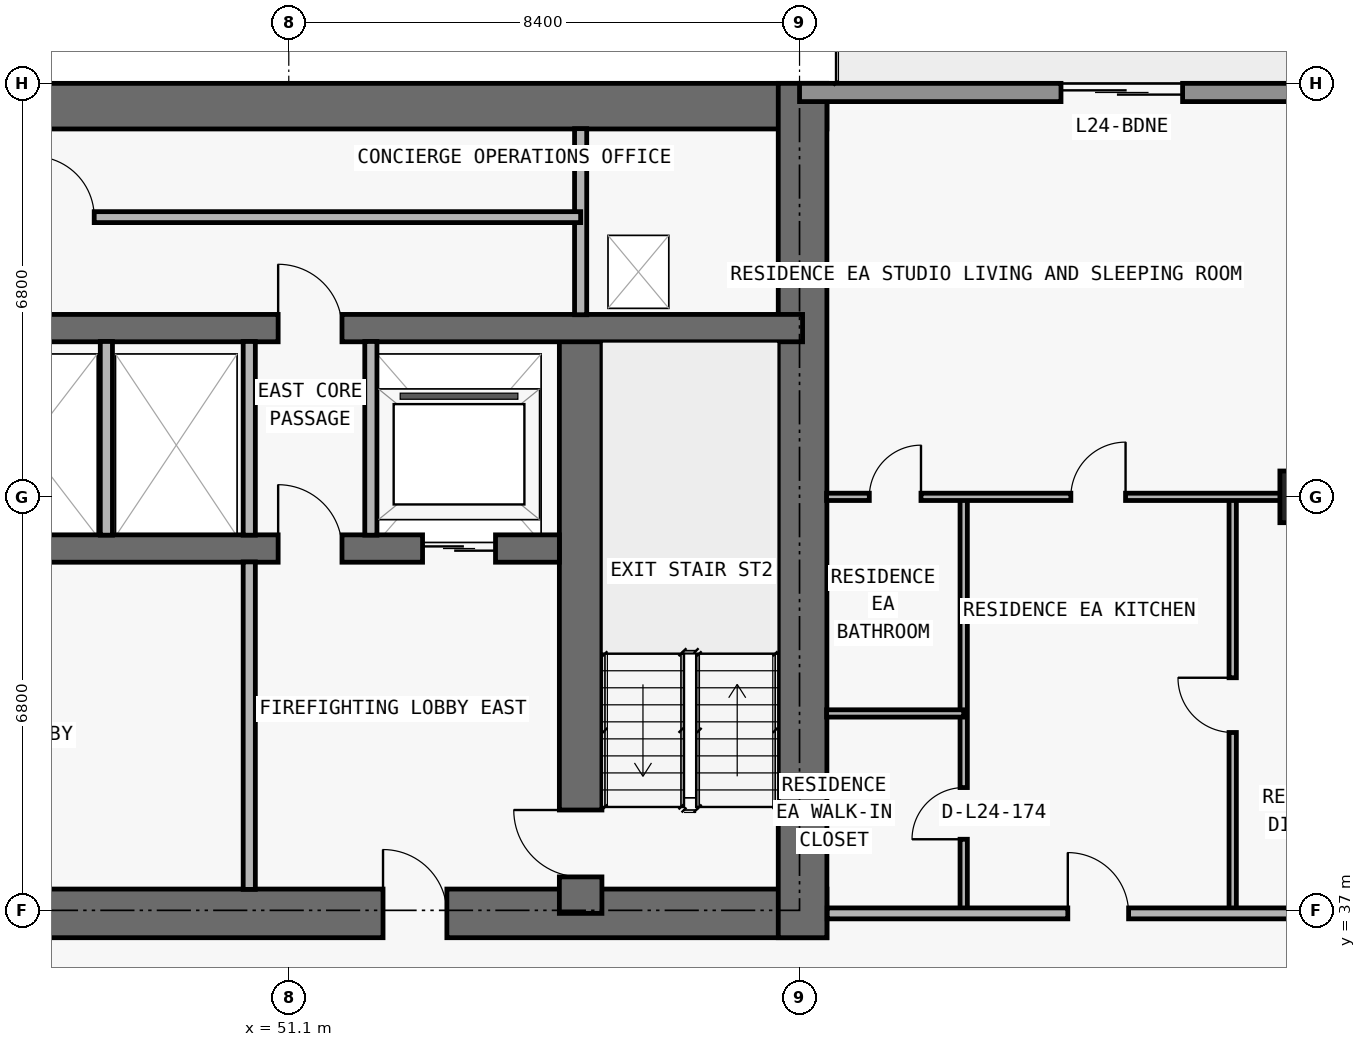
"""IFC4 building model, lengths in metres.
Left out: names, types, materials, properties, quantities, classifications, styles, units other than length and angle.
Written with IfcOpenShell. Run it as: python <this file> out.ifc"""

import sys

from ifc_helpers import new_model, si_unit, direction, frame, frame_2d, origin, origin_2d, place, context, subcontext, project, spatial, rectangle, extrude, element, fill, save


model = new_model("IFC4")
c1 = context("Model", 3, precision=1e-05, world=origin(), true_north=direction((0.0, 1.0)))
c2 = subcontext(c1, "Body", "Model", "MODEL_VIEW")
j1 = project(units=[si_unit("LENGTHUNIT", "METRE"), si_unit("PLANEANGLEUNIT", "RADIAN")], contexts=[c1])
p1 = place(None, origin())
s1 = spatial("IfcSite", under=j1, at=p1, CompositionType="ELEMENT")
p2 = place(p1, origin())
s2 = spatial("IfcBuilding", under=s1, at=p2, CompositionType="ELEMENT")
p3 = place(p2, frame((0.0, 0.0, 91.2)))
s3 = spatial("IfcBuildingStorey", under=s2, at=p3, CompositionType="ELEMENT", Elevation=91.2)
p4 = place(p3, frame((67.9, 43.8, 0.0), z_axis=(0.0, 0.0, 1.0), x_axis=(1.0, 0.0, 0.0)))
e1 = element("IfcColumn", 1, at=p4, inside=s3, PredefinedType="COLUMN", context=c2, shape_type="SweptSolid", body=[
    extrude(rectangle(XDim=1.0, YDim=0.85, at=origin_2d()), origin(), (0.0, 0.0, 1.0), 3.05),
])
p5 = place(p3, frame((17.85, 36.95, 0.0), z_axis=(0.0, 0.0, 1.0), x_axis=(1.0, 0.0, 0.0)))
e2 = element("IfcWall", 2, at=p5, inside=s3, PredefinedType="SHEAR", context=c2, shape_type="SweptSolid", body=[
    extrude(rectangle(XDim=42.1, YDim=0.8, at=frame_2d((21.05, 0.0))), origin(), (0.0, 0.0, 1.0), 3.05),
])
p6 = place(p5, frame((14.45, 0.0, 0.0)))
e3 = element("IfcOpeningElement", 3, at=p6, cuts=e2, PredefinedType="OPENING", context=c2, shape_type="SweptSolid", body=[
    extrude(rectangle(XDim=1.1, YDim=2.15, at=frame_2d((0.55, 1.075))), frame((0.0, 0.41, 0.0), z_axis=(0.0, -1.0, 0.0), x_axis=(1.0, 0.0, 0.0)), (0.0, 0.0, 1.0), 0.82),
])
p7 = place(p5, frame((6.3, 0.0, 0.0)))
e4 = element("IfcOpeningElement", 4, at=p7, cuts=e2, PredefinedType="OPENING", context=c2, shape_type="SweptSolid", body=[
    extrude(rectangle(XDim=1.05, YDim=2.15, at=frame_2d((0.525, 1.075))), frame((0.0, 0.41, 0.0), z_axis=(0.0, -1.0, 0.0), x_axis=(1.0, 0.0, 0.0)), (0.0, 0.0, 1.0), 0.82),
])
p8 = place(p5, frame((34.8, 0.0, 0.0)))
e5 = element("IfcOpeningElement", 5, at=p8, cuts=e2, PredefinedType="OPENING", context=c2, shape_type="SweptSolid", body=[
    extrude(rectangle(XDim=1.05, YDim=2.15, at=frame_2d((0.525, 1.075))), frame((0.0, 0.41, 0.0), z_axis=(0.0, -1.0, 0.0), x_axis=(1.0, 0.0, 0.0)), (0.0, 0.0, 1.0), 0.82),
])
p9 = place(p5, frame((10.913, 0.0, 0.0)))
e6 = element("IfcOpeningElement", 6, at=p9, cuts=e2, PredefinedType="OPENING", context=c2, shape_type="SweptSolid", body=[
    extrude(rectangle(XDim=1.05, YDim=2.15, at=frame_2d((0.525, 1.075))), frame((0.0, 0.41, 0.0), z_axis=(0.0, -1.0, 0.0), x_axis=(1.0, 0.0, 0.0)), (0.0, 0.0, 1.0), 0.82),
])
p10 = place(p5, frame((24.15, 0.0, 0.0)))
e7 = element("IfcOpeningElement", 7, at=p10, cuts=e2, PredefinedType="OPENING", context=c2, shape_type="SweptSolid", body=[
    extrude(rectangle(XDim=1.05, YDim=2.15, at=frame_2d((0.525, 1.075))), frame((0.0, 0.41, 0.0), z_axis=(0.0, -1.0, 0.0), x_axis=(1.0, 0.0, 0.0)), (0.0, 0.0, 1.0), 0.82),
])
p11 = place(p3, frame((17.85, 50.225, 0.0), z_axis=(0.0, 0.0, 1.0), x_axis=(1.0, 0.0, 0.0)))
e8 = element("IfcWall", 8, at=p11, inside=s3, PredefinedType="SHEAR", context=c2, shape_type="SweptSolid", body=[
    extrude(rectangle(XDim=42.1, YDim=0.75, at=frame_2d((21.05, 0.0))), origin(), (0.0, 0.0, 1.0), 3.05),
])
p12 = place(p3, frame((59.55, 36.55, 0.0), z_axis=(0.0, 0.0, 1.0), x_axis=(0.0, 1.0, 0.0)))
e9 = element("IfcWall", 9, at=p12, inside=s3, PredefinedType="SHEAR", context=c2, shape_type="SweptSolid", body=[
    extrude(rectangle(XDim=14.05, YDim=0.8, at=frame_2d((7.025, 0.0))), origin(), (0.0, 0.0, 1.0), 3.05),
])
p13 = place(p3, frame((55.9, 36.95, 0.0), z_axis=(0.0, 0.0, 1.0), x_axis=(0.0, 1.0, 0.0)))
e10 = element("IfcWall", 10, at=p13, inside=s3, PredefinedType="SHEAR", context=c2, shape_type="SweptSolid", body=[
    extrude(rectangle(XDim=9.625, YDim=0.7, at=frame_2d((4.812, 0.0))), origin(), (0.0, 0.0, 1.0), 3.05),
])
p14 = place(p13, frame((0.6, 0.0, 0.0)))
e11 = element("IfcOpeningElement", 11, at=p14, cuts=e10, PredefinedType="OPENING", context=c2, shape_type="SweptSolid", body=[
    extrude(rectangle(XDim=1.1, YDim=2.15, at=frame_2d((0.55, 1.075))), frame((0.0, 0.36, 0.0), z_axis=(0.0, -1.0, 0.0), x_axis=(1.0, 0.0, 0.0)), (0.0, 0.0, 1.0), 0.72),
])
p15 = place(p3, frame((22.25, 42.95, 0.0), z_axis=(0.0, 0.0, 1.0), x_axis=(1.0, 0.0, 0.0)))
e12 = element("IfcWall", 12, at=p15, inside=s3, PredefinedType="SHEAR", context=c2, shape_type="SweptSolid", body=[
    extrude(rectangle(XDim=33.3, YDim=0.45, at=frame_2d((16.65, 0.0))), origin(), (0.0, 0.0, 1.0), 3.05),
])
p16 = place(p15, frame((1.05, 0.0, 0.0)))
e13 = element("IfcOpeningElement", 13, at=p16, cuts=e12, PredefinedType="OPENING", context=c2, shape_type="SweptSolid", body=[
    extrude(rectangle(XDim=1.2, YDim=2.2, at=frame_2d((0.6, 1.1))), frame((0.0, 0.235, 0.0), z_axis=(0.0, -1.0, 0.0), x_axis=(1.0, 0.0, 0.0)), (0.0, 0.0, 1.0), 0.47),
])
p17 = place(p15, frame((31.05, 0.0, 0.0)))
e14 = element("IfcOpeningElement", 14, at=p17, cuts=e12, PredefinedType="OPENING", context=c2, shape_type="SweptSolid", body=[
    extrude(rectangle(XDim=1.2, YDim=2.2, at=frame_2d((0.6, 1.1))), frame((0.0, 0.235, 0.0), z_axis=(0.0, -1.0, 0.0), x_axis=(1.0, 0.0, 0.0)), (0.0, 0.0, 1.0), 0.47),
])
p18 = place(p15, frame((13.5, 0.0, 0.0)))
e15 = element("IfcOpeningElement", 15, at=p18, cuts=e12, PredefinedType="OPENING", context=c2, shape_type="SweptSolid", body=[
    extrude(rectangle(XDim=1.1, YDim=2.2, at=frame_2d((0.55, 1.1))), frame((0.0, 0.235, 0.0), z_axis=(0.0, -1.0, 0.0), x_axis=(1.0, 0.0, 0.0)), (0.0, 0.0, 1.0), 0.47),
])
p19 = place(p15, frame((16.1, 0.0, 0.0)))
e16 = element("IfcOpeningElement", 16, at=p19, cuts=e12, PredefinedType="OPENING", context=c2, shape_type="SweptSolid", body=[
    extrude(rectangle(XDim=1.1, YDim=2.2, at=frame_2d((0.55, 1.1))), frame((0.0, 0.235, 0.0), z_axis=(0.0, -1.0, 0.0), x_axis=(1.0, 0.0, 0.0)), (0.0, 0.0, 1.0), 0.47),
])
p20 = place(p15, frame((18.7, 0.0, 0.0)))
e17 = element("IfcOpeningElement", 17, at=p20, cuts=e12, PredefinedType="OPENING", context=c2, shape_type="SweptSolid", body=[
    extrude(rectangle(XDim=1.1, YDim=2.2, at=frame_2d((0.55, 1.1))), frame((0.0, 0.235, 0.0), z_axis=(0.0, -1.0, 0.0), x_axis=(1.0, 0.0, 0.0)), (0.0, 0.0, 1.0), 0.47),
])
p21 = place(p15, frame((3.625, 0.0, 0.0)))
e18 = element("IfcOpeningElement", 18, at=p21, cuts=e12, PredefinedType="OPENING", context=c2, shape_type="SweptSolid", body=[
    extrude(rectangle(XDim=1.05, YDim=2.15, at=frame_2d((0.525, 1.075))), frame((0.0, 0.235, 0.0), z_axis=(0.0, -1.0, 0.0), x_axis=(1.0, 0.0, 0.0)), (0.0, 0.0, 1.0), 0.47),
])
p22 = place(p15, frame((28.675, 0.0, 0.0)))
e19 = element("IfcOpeningElement", 19, at=p22, cuts=e12, PredefinedType="OPENING", context=c2, shape_type="SweptSolid", body=[
    extrude(rectangle(XDim=1.05, YDim=2.15, at=frame_2d((0.525, 1.075))), frame((0.0, 0.235, 0.0), z_axis=(0.0, -1.0, 0.0), x_axis=(1.0, 0.0, 0.0)), (0.0, 0.0, 1.0), 0.47),
])
p23 = place(p3, frame((18.25, 46.575, 0.0), z_axis=(0.0, 0.0, 1.0), x_axis=(1.0, 0.0, 0.0)))
e20 = element("IfcWall", 20, at=p23, inside=s3, PredefinedType="SHEAR", context=c2, shape_type="SweptSolid", body=[
    extrude(rectangle(XDim=41.3, YDim=0.45, at=frame_2d((20.65, 0.0))), origin(), (0.0, 0.0, 1.0), 3.05),
])
p24 = place(p23, frame((7.625, 0.0, 0.0)))
e21 = element("IfcOpeningElement", 21, at=p24, cuts=e20, PredefinedType="OPENING", context=c2, shape_type="SweptSolid", body=[
    extrude(rectangle(XDim=1.05, YDim=2.15, at=frame_2d((0.525, 1.075))), frame((0.0, 0.235, 0.0), z_axis=(0.0, -1.0, 0.0), x_axis=(1.0, 0.0, 0.0)), (0.0, 0.0, 1.0), 0.47),
])
p25 = place(p23, frame((32.675, 0.0, 0.0)))
e22 = element("IfcOpeningElement", 22, at=p25, cuts=e20, PredefinedType="OPENING", context=c2, shape_type="SweptSolid", body=[
    extrude(rectangle(XDim=1.05, YDim=2.15, at=frame_2d((0.525, 1.075))), frame((0.0, 0.235, 0.0), z_axis=(0.0, -1.0, 0.0), x_axis=(1.0, 0.0, 0.0)), (0.0, 0.0, 1.0), 0.47),
])
p26 = place(p3, frame((59.5, 50.45, 0.0), z_axis=(0.0, 0.0, 1.0), x_axis=(1.0, 0.0, 0.0)))
e23 = element("IfcWall", 23, at=p26, inside=s3, PredefinedType="STANDARD", context=c2, shape_type="SweptSolid", body=[
    extrude(rectangle(XDim=10.6, YDim=0.3, at=frame_2d((5.3, 0.0))), origin(), (0.0, 0.0, 1.0), 3.05),
])
p27 = place(p26, frame((4.3, 0.0, 0.0)))
e24 = element("IfcOpeningElement", 24, at=p27, cuts=e23, PredefinedType="OPENING", context=c2, shape_type="SweptSolid", body=[
    extrude(rectangle(XDim=2.0, YDim=2.3, at=frame_2d((1.0, 1.15))), frame((0.0, 0.16, 0.0), z_axis=(0.0, -1.0, 0.0), x_axis=(1.0, 0.0, 0.0)), (0.0, 0.0, 1.0), 0.32),
])
p28 = place(p3, frame((48.1, 43.17, 0.0), z_axis=(0.0, 0.0, 1.0), x_axis=(0.0, 1.0, 0.0)))
e25 = element("IfcWall", 25, at=p28, inside=s3, PredefinedType="PARTITIONING", context=c2, shape_type="SweptSolid", body=[
    extrude(rectangle(XDim=3.185, YDim=0.2, at=frame_2d((1.593, 0.0))), origin(), (0.0, 0.0, 1.0), 3.05),
])
p29 = place(p3, frame((50.45, 37.345, 0.0), z_axis=(0.0, 0.0, 1.0), x_axis=(0.0, 1.0, 0.0)))
e26 = element("IfcWall", 26, at=p29, inside=s3, PredefinedType="PARTITIONING", context=c2, shape_type="SweptSolid", body=[
    extrude(rectangle(XDim=5.385, YDim=0.2, at=frame_2d((2.692, 0.0))), origin(), (0.0, 0.0, 1.0), 3.05),
])
for number, where, z_axis, x_axis in (
    (27, (50.45, 43.17, 0.0), (0.0, 0.0, 1.0), (0.0, 1.0, 0.0)),
    (28, (52.45, 43.17, 0.0), (0.0, 0.0, 1.0), (0.0, 1.0, 0.0)),
):
    element("IfcWall", number, at=place(p3, frame(where, z_axis=z_axis, x_axis=x_axis)), inside=s3, PredefinedType="PARTITIONING", context=c2, shape_type="SweptSolid", body=[
        extrude(rectangle(XDim=3.185, YDim=0.2, at=frame_2d((1.593, 0.0))), origin(), (0.0, 0.0, 1.0), 3.05),
    ])
p30 = place(p3, frame((55.9, 46.795, 0.0), z_axis=(0.0, 0.0, 1.0), x_axis=(0.0, 1.0, 0.0)))
e29 = element("IfcWall", 29, at=p30, inside=s3, PredefinedType="PARTITIONING", context=c2, shape_type="SweptSolid", body=[
    extrude(rectangle(XDim=3.06, YDim=0.2, at=frame_2d((1.53, 0.0))), origin(), (0.0, 0.0, 1.0), 3.05),
])
p31 = place(p3, frame((62.2, 36.95, 0.0), z_axis=(0.0, 0.0, 1.0), x_axis=(0.0, 1.0, 0.0)))
e30 = element("IfcWall", 30, at=p31, inside=s3, PredefinedType="PARTITIONING", context=c2, shape_type="SweptSolid", body=[
    extrude(rectangle(XDim=6.85, YDim=0.12, at=frame_2d((3.425, 0.0))), origin(), (0.0, 0.0, 1.0), 2.499),
])
p32 = place(p31, frame((1.219, 0.0, 0.0)))
e31 = element("IfcOpeningElement", 31, at=p32, cuts=e30, PredefinedType="OPENING", context=c2, shape_type="SweptSolid", body=[
    extrude(rectangle(XDim=0.85, YDim=2.1, at=frame_2d((0.425, 1.05))), frame((0.0, 0.07, 0.0), z_axis=(0.0, -1.0, 0.0), x_axis=(1.0, 0.0, 0.0)), (0.0, 0.0, 1.0), 0.14),
])
p33 = place(p3, frame((66.624, 36.95, 0.0), z_axis=(0.0, 0.0, 1.0), x_axis=(0.0, 1.0, 0.0)))
e32 = element("IfcWall", 32, at=p33, inside=s3, PredefinedType="PARTITIONING", context=c2, shape_type="SweptSolid", body=[
    extrude(rectangle(XDim=6.85, YDim=0.12, at=frame_2d((3.425, 0.0))), origin(), (0.0, 0.0, 1.0), 3.05),
])
p34 = place(p33, frame((2.975, 0.0, 0.0)))
e33 = element("IfcOpeningElement", 33, at=p34, cuts=e32, PredefinedType="OPENING", context=c2, shape_type="SweptSolid", body=[
    extrude(rectangle(XDim=0.9, YDim=2.15, at=frame_2d((0.45, 1.075))), frame((0.0, 0.07, 0.0), z_axis=(0.0, -1.0, 0.0), x_axis=(1.0, 0.0, 0.0)), (0.0, 0.0, 1.0), 0.14),
])
p35 = place(p3, frame((59.955, 36.95, 0.0), z_axis=(0.0, 0.0, 1.0), x_axis=(1.0, 0.0, 0.0)))
e34 = element("IfcWall", 34, at=p35, inside=s3, PredefinedType="PARTITIONING", context=c2, shape_type="SweptSolid", body=[
    extrude(rectangle(XDim=10.145, YDim=0.18, at=frame_2d((5.073, 0.0))), origin(), (0.0, 0.0, 1.0), 3.05),
])
p36 = place(p35, frame((3.957, 0.0, 0.0)))
e35 = element("IfcOpeningElement", 35, at=p36, cuts=e34, PredefinedType="OPENING", context=c2, shape_type="SweptSolid", body=[
    extrude(rectangle(XDim=1.0, YDim=2.2, at=frame_2d((0.5, 1.1))), frame((0.0, 0.1, 0.0), z_axis=(0.0, -1.0, 0.0), x_axis=(1.0, 0.0, 0.0)), (0.0, 0.0, 1.0), 0.2),
])
p37 = place(p3, frame((59.945, 40.238, 0.0), z_axis=(0.0, 0.0, 1.0), x_axis=(1.0, 0.0, 0.0)))
e36 = element("IfcWall", 36, at=p37, inside=s3, PredefinedType="PARTITIONING", context=c2, shape_type="SweptSolid", body=[
    extrude(rectangle(XDim=2.255, YDim=0.12, at=frame_2d((1.127, 0.0))), origin(), (0.0, 0.0, 1.0), 3.05),
])
p38 = place(p3, frame((59.945, 43.8, 0.0), z_axis=(0.0, 0.0, 1.0), x_axis=(1.0, 0.0, 0.0)))
e37 = element("IfcWall", 37, at=p38, inside=s3, PredefinedType="PARTITIONING", context=c2, shape_type="SweptSolid", body=[
    extrude(rectangle(XDim=13.66, YDim=0.12, at=frame_2d((6.83, 0.0))), origin(), (0.0, 0.0, 1.0), 2.339),
])
p39 = place(p38, frame((4.017, 0.0, 0.0)))
e38 = element("IfcOpeningElement", 38, at=p39, cuts=e37, PredefinedType="OPENING", context=c2, shape_type="SweptSolid", body=[
    extrude(rectangle(XDim=0.9, YDim=2.15, at=frame_2d((0.45, 1.075))), frame((0.0, 0.07, 0.0), z_axis=(0.0, -1.0, 0.0), x_axis=(1.0, 0.0, 0.0)), (0.0, 0.0, 1.0), 0.14),
])
p40 = place(p38, frame((0.702, 0.0, 0.0)))
e39 = element("IfcOpeningElement", 39, at=p40, cuts=e37, PredefinedType="OPENING", context=c2, shape_type="SweptSolid", body=[
    extrude(rectangle(XDim=0.85, YDim=2.1, at=frame_2d((0.425, 1.05))), frame((0.0, 0.07, 0.0), z_axis=(0.0, -1.0, 0.0), x_axis=(1.0, 0.0, 0.0)), (0.0, 0.0, 1.0), 0.14),
])
p41 = place(p3, frame((21.9, 48.4, 0.0), z_axis=(0.0, 0.0, 1.0), x_axis=(1.0, 0.0, 0.0)))
e40 = element("IfcWall", 40, at=p41, inside=s3, PredefinedType="PARTITIONING", context=c2, shape_type="SweptSolid", body=[
    extrude(rectangle(XDim=34.0, YDim=0.18, at=frame_2d((17.0, 0.0))), origin(), (0.0, 0.0, 1.0), 3.05),
])
p42 = place(p41, frame((8.0, 0.0, 0.0)))
e41 = element("IfcOpeningElement", 41, at=p42, cuts=e40, PredefinedType="OPENING", context=c2, shape_type="SweptSolid", body=[
    extrude(rectangle(XDim=1.0, YDim=2.2, at=frame_2d((0.5, 1.1))), frame((0.0, 0.1, 0.0), z_axis=(0.0, -1.0, 0.0), x_axis=(1.0, 0.0, 0.0)), (0.0, 0.0, 1.0), 0.2),
])
p43 = place(p41, frame((25.0, 0.0, 0.0)))
e42 = element("IfcOpeningElement", 42, at=p43, cuts=e40, PredefinedType="OPENING", context=c2, shape_type="SweptSolid", body=[
    extrude(rectangle(XDim=1.0, YDim=2.2, at=frame_2d((0.5, 1.1))), frame((0.0, 0.1, 0.0), z_axis=(0.0, -1.0, 0.0), x_axis=(1.0, 0.0, 0.0)), (0.0, 0.0, 1.0), 0.2),
])
p44 = place(p27, origin())
e43 = element("IfcDoor", 43, at=p44, inside=s3, OperationType="DOUBLE_DOOR_SLIDING", PredefinedType="DOOR", context=c2, shape_type="SweptSolid", body=[
    extrude(rectangle(XDim=2.0, YDim=2.3, at=frame_2d((1.0, 1.15))), frame((0.0, 0.025, 0.0), z_axis=(0.0, -1.0, 0.0), x_axis=(1.0, 0.0, 0.0)), (0.0, 0.0, 1.0), 0.05),
])
fill(e24, e43)
p45 = place(p17, origin())
e44 = element("IfcDoor", 44, at=p45, inside=s3, OperationType="DOUBLE_DOOR_SLIDING", PredefinedType="DOOR", context=c2, shape_type="SweptSolid", body=[
    extrude(rectangle(XDim=1.2, YDim=2.2, at=frame_2d((0.6, 1.1))), frame((0.0, 0.025, 0.0), z_axis=(0.0, -1.0, 0.0), x_axis=(1.0, 0.0, 0.0)), (0.0, 0.0, 1.0), 0.05),
])
fill(e14, e44)
p46 = place(p8, origin())
e45 = element("IfcDoor", 45, at=p46, inside=s3, OperationType="SINGLE_SWING_LEFT", PredefinedType="DOOR", context=c2, shape_type="SweptSolid", body=[
    extrude(rectangle(XDim=1.05, YDim=2.15, at=frame_2d((0.525, 1.075))), frame((0.0, 0.025, 0.0), z_axis=(0.0, -1.0, 0.0), x_axis=(1.0, 0.0, 0.0)), (0.0, 0.0, 1.0), 0.05),
])
fill(e5, e45)
p47 = place(p14, origin())
e46 = element("IfcDoor", 46, at=p47, inside=s3, OperationType="SINGLE_SWING_RIGHT", PredefinedType="DOOR", context=c2, shape_type="SweptSolid", body=[
    extrude(rectangle(XDim=1.1, YDim=2.15, at=frame_2d((0.55, 1.075))), frame((0.0, 0.025, 0.0), z_axis=(0.0, -1.0, 0.0), x_axis=(1.0, 0.0, 0.0)), (0.0, 0.0, 1.0), 0.05),
])
fill(e11, e46)
p48 = place(p22, origin())
e47 = element("IfcDoor", 47, at=p48, inside=s3, OperationType="SINGLE_SWING_LEFT", PredefinedType="DOOR", context=c2, shape_type="SweptSolid", body=[
    extrude(rectangle(XDim=1.05, YDim=2.15, at=frame_2d((0.525, 1.075))), frame((0.0, 0.025, 0.0), z_axis=(0.0, -1.0, 0.0), x_axis=(1.0, 0.0, 0.0)), (0.0, 0.0, 1.0), 0.05),
])
fill(e19, e47)
p49 = place(p25, origin())
e48 = element("IfcDoor", 48, at=p49, inside=s3, OperationType="SINGLE_SWING_LEFT", PredefinedType="DOOR", context=c2, shape_type="SweptSolid", body=[
    extrude(rectangle(XDim=1.05, YDim=2.15, at=frame_2d((0.525, 1.075))), frame((0.0, 0.025, 0.0), z_axis=(0.0, -1.0, 0.0), x_axis=(1.0, 0.0, 0.0)), (0.0, 0.0, 1.0), 0.05),
])
fill(e22, e48)
p50 = place(p43, origin())
e49 = element("IfcDoor", 49, at=p50, inside=s3, OperationType="SINGLE_SWING_LEFT", PredefinedType="DOOR", context=c2, shape_type="SweptSolid", body=[
    extrude(rectangle(XDim=1.0, YDim=2.2, at=frame_2d((0.5, 1.1))), frame((0.0, 0.025, 0.0), z_axis=(0.0, -1.0, 0.0), x_axis=(1.0, 0.0, 0.0)), (0.0, 0.0, 1.0), 0.05),
])
fill(e42, e49)
p51 = place(p34, origin())
e50 = element("IfcDoor", 50, at=p51, inside=s3, OperationType="SINGLE_SWING_RIGHT", PredefinedType="DOOR", context=c2, shape_type="SweptSolid", body=[
    extrude(rectangle(XDim=0.9, YDim=2.15, at=frame_2d((0.45, 1.075))), frame((0.0, 0.025, 0.0), z_axis=(0.0, -1.0, 0.0), x_axis=(1.0, 0.0, 0.0)), (0.0, 0.0, 1.0), 0.05),
])
fill(e33, e50)
p52 = place(p36, origin())
e51 = element("IfcDoor", 51, at=p52, inside=s3, OperationType="SINGLE_SWING_LEFT", PredefinedType="DOOR", context=c2, shape_type="SweptSolid", body=[
    extrude(rectangle(XDim=1.0, YDim=2.2, at=frame_2d((0.5, 1.1))), frame((0.0, 0.025, 0.0), z_axis=(0.0, -1.0, 0.0), x_axis=(1.0, 0.0, 0.0)), (0.0, 0.0, 1.0), 0.05),
])
fill(e35, e51)
p53 = place(p39, origin())
e52 = element("IfcDoor", 52, at=p53, inside=s3, OperationType="SINGLE_SWING_RIGHT", PredefinedType="DOOR", context=c2, shape_type="SweptSolid", body=[
    extrude(rectangle(XDim=0.9, YDim=2.15, at=frame_2d((0.45, 1.075))), frame((0.0, 0.025, 0.0), z_axis=(0.0, -1.0, 0.0), x_axis=(1.0, 0.0, 0.0)), (0.0, 0.0, 1.0), 0.05),
])
fill(e38, e52)
p54 = place(p32, origin())
e53 = element("IfcDoor", 53, at=p54, inside=s3, OperationType="SINGLE_SWING_LEFT", PredefinedType="DOOR", context=c2, shape_type="SweptSolid", body=[
    extrude(rectangle(XDim=0.85, YDim=2.1, at=frame_2d((0.425, 1.05))), frame((0.0, 0.025, 0.0), z_axis=(0.0, -1.0, 0.0), x_axis=(1.0, 0.0, 0.0)), (0.0, 0.0, 1.0), 0.05),
])
fill(e31, e53)
p55 = place(p40, origin())
e54 = element("IfcDoor", 54, at=p55, inside=s3, OperationType="SINGLE_SWING_RIGHT", PredefinedType="DOOR", context=c2, shape_type="SweptSolid", body=[
    extrude(rectangle(XDim=0.85, YDim=2.1, at=frame_2d((0.425, 1.05))), frame((0.0, 0.025, 0.0), z_axis=(0.0, -1.0, 0.0), x_axis=(1.0, 0.0, 0.0)), (0.0, 0.0, 1.0), 0.05),
])
fill(e39, e54)
save(model, sys.argv[1])
